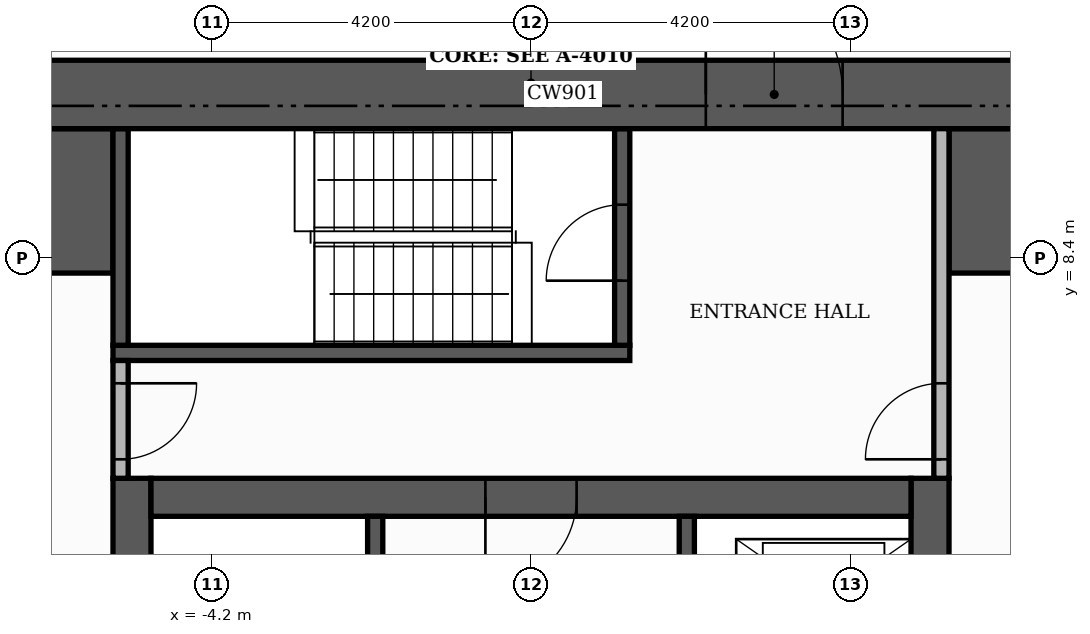
"""IFC4 building model, lengths in metres.
Left out: names, types, materials, properties, quantities, classifications, styles, units other than length and angle.
Written with IfcOpenShell. Run it as: python <this file> out.ifc"""

import sys

from ifc_helpers import new_model, si_unit, direction, frame, frame_2d, origin, place, context, subcontext, project, spatial, rectangle, extrude, element, fill, save


model = new_model("IFC4")
c1 = context("Model", 3, precision=1e-05, world=origin(), true_north=direction((0.0, 1.0)))
c2 = subcontext(c1, "Body", "Model", "MODEL_VIEW")
j1 = project(units=[si_unit("LENGTHUNIT", "METRE"), si_unit("PLANEANGLEUNIT", "RADIAN")], contexts=[c1])
p1 = place(None, origin())
s1 = spatial("IfcSite", under=j1, at=p1, CompositionType="ELEMENT")
p2 = place(p1, origin())
s2 = spatial("IfcBuilding", under=s1, at=p2, CompositionType="ELEMENT")
p3 = place(p2, frame((0.0, 0.0, 58.2)))
s3 = spatial("IfcBuildingStorey", under=s2, at=p3, CompositionType="ELEMENT", Elevation=58.2)
for number, where, z_axis, x_axis in (
    (1, (-5.25, -5.0, 0.0), (0.0, 0.0, 1.0), (0.0, 1.0, 0.0)),
    (2, (5.25, -5.0, 0.0), (0.0, 0.0, 1.0), (0.0, 1.0, 0.0)),
):
    element("IfcWall", number, at=place(p3, frame(where, z_axis=z_axis, x_axis=x_axis)), inside=s3, PredefinedType="SHEAR", context=c2, shape_type="SweptSolid", body=[
        extrude(rectangle(XDim=10.5, YDim=0.5, at=frame_2d((5.25, 0.0))), origin(), (0.0, 0.0, 1.0), 3.48),
    ])
p4 = place(p3, frame((-5.0, 5.25, 0.0), z_axis=(0.0, 0.0, 1.0), x_axis=(1.0, 0.0, 0.0)))
e3 = element("IfcWall", 3, at=p4, inside=s3, PredefinedType="SHEAR", context=c2, shape_type="SweptSolid", body=[
    extrude(rectangle(XDim=10.0, YDim=0.5, at=frame_2d((5.0, 0.0))), origin(), (0.0, 0.0, 1.0), 3.48),
])
p5 = place(p4, frame((4.4, 0.0, 0.0)))
e4 = element("IfcOpeningElement", 4, at=p5, cuts=e3, PredefinedType="OPENING", context=c2, shape_type="SweptSolid", body=[
    extrude(rectangle(XDim=1.2, YDim=2.1, at=frame_2d((0.6, 1.05))), frame((0.0, 0.26, 0.0), z_axis=(0.0, -1.0, 0.0), x_axis=(1.0, 0.0, 0.0)), (0.0, 0.0, 1.0), 0.52),
])
for number, where, z_axis, x_axis in (
    (5, (-10.1, 9.15, 0.0), (0.0, 0.0, 1.0), (1.0, 0.0, 0.0)),
    (6, (5.5, 9.15, 0.0), (0.0, 0.0, 1.0), (1.0, 0.0, 0.0)),
):
    element("IfcWall", number, at=place(p3, frame(where, z_axis=z_axis, x_axis=x_axis)), inside=s3, PredefinedType="SHEAR", context=c2, shape_type="SweptSolid", body=[
        extrude(rectangle(XDim=4.6, YDim=1.9, at=frame_2d((2.3, 0.0))), origin(), (0.0, 0.0, 1.0), 3.48),
    ])
p6 = place(p3, frame((-2.05, -1.4, 0.0), z_axis=(0.0, 0.0, 1.0), x_axis=(0.0, 1.0, 0.0)))
e7 = element("IfcWall", 7, at=p6, inside=s3, PredefinedType="SHEAR", context=c2, shape_type="SweptSolid", body=[
    extrude(rectangle(XDim=6.4, YDim=0.2, at=frame_2d((3.2, 0.0))), origin(), (0.0, 0.0, 1.0), 3.48),
])
p7 = place(p6, frame((0.15, 0.0, 0.0)))
e8 = element("IfcOpeningElement", 8, at=p7, cuts=e7, PredefinedType="OPENING", context=c2, shape_type="SweptSolid", body=[
    extrude(rectangle(XDim=1.0, YDim=2.1, at=frame_2d((0.5, 1.05))), frame((0.0, 0.11, 0.0), z_axis=(0.0, -1.0, 0.0), x_axis=(1.0, 0.0, 0.0)), (0.0, 0.0, 1.0), 0.22),
])
p8 = place(p3, frame((-5.5, 7.15, 0.0), z_axis=(0.0, 0.0, 1.0), x_axis=(1.0, 0.0, 0.0)))
e9 = element("IfcWall", 9, at=p8, inside=s3, PredefinedType="SHEAR", context=c2, shape_type="SweptSolid", body=[
    extrude(rectangle(XDim=6.8, YDim=0.2, at=frame_2d((3.4, 0.0))), origin(), (0.0, 0.0, 1.0), 3.48),
])
p9 = place(p3, frame((-5.4, 7.25, 0.0), z_axis=(0.0, 0.0, 1.0), x_axis=(0.0, 1.0, 0.0)))
e10 = element("IfcWall", 10, at=p9, inside=s3, PredefinedType="SHEAR", context=c2, shape_type="SweptSolid", body=[
    extrude(rectangle(XDim=2.85, YDim=0.2, at=frame_2d((1.425, 0.0))), origin(), (0.0, 0.0, 1.0), 3.48),
])
p10 = place(p3, frame((1.2, 7.25, 0.0), z_axis=(0.0, 0.0, 1.0), x_axis=(0.0, 1.0, 0.0)))
e11 = element("IfcWall", 11, at=p10, inside=s3, PredefinedType="SHEAR", context=c2, shape_type="SweptSolid", body=[
    extrude(rectangle(XDim=2.85, YDim=0.2, at=frame_2d((1.425, 0.0))), origin(), (0.0, 0.0, 1.0), 3.48),
])
p11 = place(p10, frame((0.85, 0.0, 0.0)))
e12 = element("IfcOpeningElement", 12, at=p11, cuts=e11, PredefinedType="OPENING", context=c2, shape_type="SweptSolid", body=[
    extrude(rectangle(XDim=1.0, YDim=2.1, at=frame_2d((0.5, 1.05))), frame((0.0, 0.11, 0.0), z_axis=(0.0, -1.0, 0.0), x_axis=(1.0, 0.0, 0.0)), (0.0, 0.0, 1.0), 0.22),
])
p12 = place(p3, frame((2.05, 1.6, 0.0), z_axis=(0.0, 0.0, 1.0), x_axis=(0.0, 1.0, 0.0)))
e13 = element("IfcWall", 13, at=p12, inside=s3, PredefinedType="SHEAR", context=c2, shape_type="SweptSolid", body=[
    extrude(rectangle(XDim=3.4, YDim=0.2, at=frame_2d((1.7, 0.0))), origin(), (0.0, 0.0, 1.0), 3.48),
])
p13 = place(p12, frame((1.75, 0.0, 0.0)))
e14 = element("IfcOpeningElement", 14, at=p13, cuts=e13, PredefinedType="OPENING", context=c2, shape_type="SweptSolid", body=[
    extrude(rectangle(XDim=1.1, YDim=2.1, at=frame_2d((0.55, 1.05))), frame((0.0, 0.11, 0.0), z_axis=(0.0, -1.0, 0.0), x_axis=(1.0, 0.0, 0.0)), (0.0, 0.0, 1.0), 0.22),
])
p14 = place(p12, frame((0.15, 0.0, 0.0)))
e15 = element("IfcOpeningElement", 15, at=p14, cuts=e13, PredefinedType="OPENING", context=c2, shape_type="SweptSolid", body=[
    extrude(rectangle(XDim=0.8, YDim=2.1, at=frame_2d((0.4, 1.05))), frame((0.0, 0.11, 0.0), z_axis=(0.0, -1.0, 0.0), x_axis=(1.0, 0.0, 0.0)), (0.0, 0.0, 1.0), 0.22),
])
p15 = place(p3, frame((-11.0, 10.55, 0.0), z_axis=(0.0, 0.0, 1.0), x_axis=(1.0, 0.0, 0.0)))
e16 = element("IfcWall", 16, at=p15, inside=s3, PredefinedType="SHEAR", context=c2, shape_type="SweptSolid", body=[
    extrude(rectangle(XDim=22.0, YDim=0.9, at=frame_2d((11.0, 0.0))), origin(), (0.0, 0.0, 1.0), 3.48),
])
p16 = place(p15, frame((13.3, 0.0, 0.0)))
e17 = element("IfcOpeningElement", 17, at=p16, cuts=e16, PredefinedType="OPENING", context=c2, shape_type="SweptSolid", body=[
    extrude(rectangle(XDim=1.8, YDim=2.2, at=frame_2d((0.9, 1.1))), frame((0.0, 0.46, 0.0), z_axis=(0.0, -1.0, 0.0), x_axis=(1.0, 0.0, 0.0)), (0.0, 0.0, 1.0), 0.92),
])
p17 = place(p3, frame((-5.4, 5.5, 0.0), z_axis=(0.0, 0.0, 1.0), x_axis=(0.0, 1.0, 0.0)))
e18 = element("IfcWall", 18, at=p17, inside=s3, PredefinedType="PARTITIONING", context=c2, shape_type="SweptSolid", body=[
    extrude(rectangle(XDim=1.55, YDim=0.2, at=frame_2d((0.775, 0.0))), origin(), (0.0, 0.0, 1.0), 3.48),
])
p18 = place(p17, frame((0.25, 0.0, 0.0)))
e19 = element("IfcOpeningElement", 19, at=p18, cuts=e18, PredefinedType="OPENING", context=c2, shape_type="SweptSolid", body=[
    extrude(rectangle(XDim=1.0, YDim=2.1, at=frame_2d((0.5, 1.05))), frame((0.0, 0.11, 0.0), z_axis=(0.0, -1.0, 0.0), x_axis=(1.0, 0.0, 0.0)), (0.0, 0.0, 1.0), 0.22),
])
p19 = place(p3, frame((5.4, 5.5, 0.0), z_axis=(0.0, 0.0, 1.0), x_axis=(0.0, 1.0, 0.0)))
e20 = element("IfcWall", 20, at=p19, inside=s3, PredefinedType="PARTITIONING", context=c2, shape_type="SweptSolid", body=[
    extrude(rectangle(XDim=4.6, YDim=0.2, at=frame_2d((2.3, 0.0))), origin(), (0.0, 0.0, 1.0), 3.48),
])
p20 = place(p19, frame((0.25, 0.0, 0.0)))
e21 = element("IfcOpeningElement", 21, at=p20, cuts=e20, PredefinedType="OPENING", context=c2, shape_type="SweptSolid", body=[
    extrude(rectangle(XDim=1.0, YDim=2.1, at=frame_2d((0.5, 1.05))), frame((0.0, 0.11, 0.0), z_axis=(0.0, -1.0, 0.0), x_axis=(1.0, 0.0, 0.0)), (0.0, 0.0, 1.0), 0.22),
])
p21 = place(p5, frame((1.2, 0.0, 0.0), z_axis=(0.0, 0.0, 1.0), x_axis=(-1.0, 0.0, 0.0)))
e22 = element("IfcDoor", 22, at=p21, inside=s3, OperationType="SINGLE_SWING_LEFT", PredefinedType="DOOR", context=c2, shape_type="SweptSolid", body=[
    extrude(rectangle(XDim=1.2, YDim=2.1, at=frame_2d((0.6, 1.05))), frame((0.0, 0.025, 0.0), z_axis=(0.0, -1.0, 0.0), x_axis=(1.0, 0.0, 0.0)), (0.0, 0.0, 1.0), 0.05),
])
fill(e4, e22)
p22 = place(p11, origin())
e23 = element("IfcDoor", 23, at=p22, inside=s3, OperationType="SINGLE_SWING_LEFT", PredefinedType="DOOR", context=c2, shape_type="SweptSolid", body=[
    extrude(rectangle(XDim=1.0, YDim=2.1, at=frame_2d((0.5, 1.05))), frame((0.0, 0.025, 0.0), z_axis=(0.0, -1.0, 0.0), x_axis=(1.0, 0.0, 0.0)), (0.0, 0.0, 1.0), 0.05),
])
fill(e12, e23)
p23 = place(p18, frame((1.0, 0.0, 0.0), z_axis=(0.0, 0.0, 1.0), x_axis=(-1.0, 0.0, 0.0)))
e24 = element("IfcDoor", 24, at=p23, inside=s3, OperationType="SINGLE_SWING_RIGHT", PredefinedType="DOOR", context=c2, shape_type="SweptSolid", body=[
    extrude(rectangle(XDim=1.0, YDim=2.1, at=frame_2d((0.5, 1.05))), frame((0.0, 0.025, 0.0), z_axis=(0.0, -1.0, 0.0), x_axis=(1.0, 0.0, 0.0)), (0.0, 0.0, 1.0), 0.05),
])
fill(e19, e24)
p24 = place(p20, origin())
e25 = element("IfcDoor", 25, at=p24, inside=s3, OperationType="SINGLE_SWING_LEFT", PredefinedType="DOOR", context=c2, shape_type="SweptSolid", body=[
    extrude(rectangle(XDim=1.0, YDim=2.1, at=frame_2d((0.5, 1.05))), frame((0.0, 0.025, 0.0), z_axis=(0.0, -1.0, 0.0), x_axis=(1.0, 0.0, 0.0)), (0.0, 0.0, 1.0), 0.05),
])
fill(e21, e25)
p25 = place(p16, origin())
e26 = element("IfcDoor", 26, at=p25, inside=s3, OperationType="DOUBLE_DOOR_SINGLE_SWING", PredefinedType="DOOR", context=c2, shape_type="SweptSolid", body=[
    extrude(rectangle(XDim=1.8, YDim=2.2, at=frame_2d((0.9, 1.1))), frame((0.0, 0.025, 0.0), z_axis=(0.0, -1.0, 0.0), x_axis=(1.0, 0.0, 0.0)), (0.0, 0.0, 1.0), 0.05),
])
fill(e17, e26)
save(model, sys.argv[1])
